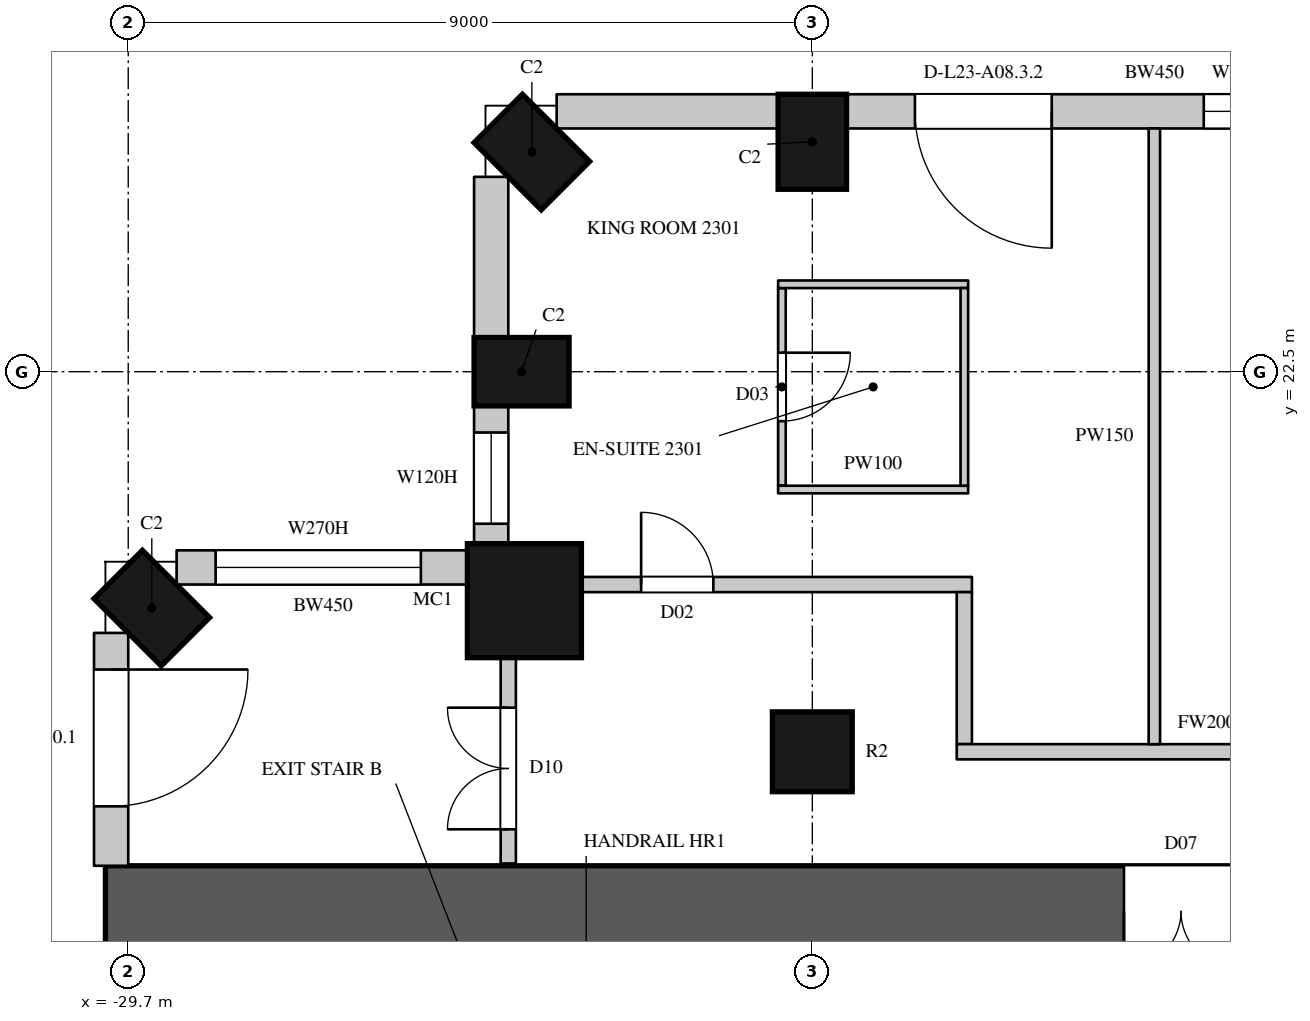
"""IFC4 building model, lengths in metres.
Left out: names, types, materials, properties, quantities, classifications, styles, units other than length and angle.
Written with IfcOpenShell. Run it as: python <this file> out.ifc"""

import sys

from ifc_helpers import new_model, si_unit, direction, frame, frame_2d, origin, origin_2d, place, context, subcontext, project, spatial, rectangle, circle, extrude, element, fill, save


model = new_model("IFC4")
c1 = context("Model", 3, precision=1e-05, world=origin(), true_north=direction((0.0, 1.0)))
c2 = subcontext(c1, "Body", "Model", "MODEL_VIEW")
j1 = project(units=[si_unit("LENGTHUNIT", "METRE"), si_unit("PLANEANGLEUNIT", "RADIAN")], contexts=[c1])
p1 = place(None, origin())
s1 = spatial("IfcSite", under=j1, at=p1, CompositionType="ELEMENT")
p2 = place(p1, origin())
s2 = spatial("IfcBuilding", under=s1, at=p2, CompositionType="ELEMENT")
p3 = place(p2, frame((0.0, 0.0, 113.1)))
s3 = spatial("IfcBuildingStorey", under=s2, at=p3, CompositionType="ELEMENT", Elevation=113.1)
for number, where, z_axis, x_axis in (
    (1, (-29.39, 19.39, 0.0), (0.0, 0.0, 1.0), (-0.707, -0.707, 0.0)),
    (2, (-20.7, 25.525, 0.0), (0.0, 0.0, 1.0), (-1.0, 0.0, 0.0)),
    (3, (-24.39, 25.39, 0.0), (0.0, 0.0, 1.0), (-0.707, -0.707, 0.0)),
    (4, (-24.525, 22.5, 0.0), (0.0, 0.0, 1.0), (0.0, -1.0, 0.0)),
):
    element("IfcColumn", number, at=place(p3, frame(where, z_axis=z_axis, x_axis=x_axis)), inside=s3, PredefinedType="COLUMN", context=c2, shape_type="SweptSolid", body=[
        extrude(rectangle(XDim=0.9, YDim=1.25, at=origin_2d()), origin(), (0.0, 0.0, 1.0), 3.6),
    ])
p4 = place(p3, frame((-24.488, 19.488, 0.0), z_axis=(0.0, 0.0, 1.0), x_axis=(1.0, 0.0, 0.0)))
e5 = element("IfcColumn", 5, at=p4, inside=s3, PredefinedType="COLUMN", context=c2, shape_type="SweptSolid", body=[
    extrude(circle(Radius=0.75, at=origin_2d()), origin(), (0.0, 0.0, 1.0), 3.6),
])
p5 = place(p3, frame((-20.7, 17.5, 0.0), z_axis=(0.0, 0.0, 1.0), x_axis=(1.0, 0.0, 0.0)))
e6 = element("IfcColumn", 6, at=p5, inside=s3, PredefinedType="COLUMN", context=c2, shape_type="SweptSolid", body=[
    extrude(circle(Radius=0.525, at=origin_2d()), origin(), (0.0, 0.0, 1.0), 3.6),
])
p6 = place(p3, frame((-29.925, 19.064, 0.0), z_axis=(0.0, 0.0, 1.0), x_axis=(0.0, -1.0, 0.0)))
e7 = element("IfcWall", 7, at=p6, inside=s3, PredefinedType="SOLIDWALL", context=c2, shape_type="SweptSolid", body=[
    extrude(rectangle(XDim=3.064, YDim=0.45, at=frame_2d((1.532, 0.0))), origin(), (0.0, 0.0, 1.0), 3.3),
])
p7 = place(p6, frame((0.482, 0.0, 0.0)))
e8 = element("IfcOpeningElement", 8, at=p7, cuts=e7, PredefinedType="OPENING", context=c2, shape_type="SweptSolid", body=[
    extrude(rectangle(XDim=1.8, YDim=2.4, at=frame_2d((0.9, 1.2))), frame((0.0, 0.235, 0.0), z_axis=(0.0, -1.0, 0.0), x_axis=(1.0, 0.0, 0.0)), (0.0, 0.0, 1.0), 0.47),
])
p8 = place(p3, frame((-12.15, 25.925, 0.0), z_axis=(0.0, 0.0, 1.0), x_axis=(-1.0, 0.0, 0.0)))
e9 = element("IfcWall", 9, at=p8, inside=s3, PredefinedType="SOLIDWALL", context=c2, shape_type="SweptSolid", body=[
    extrude(rectangle(XDim=8.1, YDim=0.45, at=frame_2d((4.05, 0.0))), origin(), (0.0, 0.0, 1.0), 3.3),
])
p9 = place(p8, frame((0.2, 0.0, 0.0)))
e10 = element("IfcOpeningElement", 10, at=p9, cuts=e9, PredefinedType="OPENING", context=c2, shape_type="SweptSolid", body=[
    extrude(rectangle(XDim=1.8, YDim=2.4, at=frame_2d((0.9, 1.2))), frame((0.0, 0.235, 0.0), z_axis=(0.0, -1.0, 0.0), x_axis=(1.0, 0.0, 0.0)), (0.0, 0.0, 1.0), 0.47),
])
p10 = place(p8, frame((2.2, 0.0, 1.05)))
e11 = element("IfcOpeningElement", 11, at=p10, cuts=e9, PredefinedType="OPENING", context=c2, shape_type="SweptSolid", body=[
    extrude(rectangle(XDim=1.2, YDim=2.0, at=frame_2d((0.6, 1.0))), frame((0.0, 0.235, 0.0), z_axis=(0.0, -1.0, 0.0), x_axis=(1.0, 0.0, 0.0)), (0.0, 0.0, 1.0), 0.47),
])
p11 = place(p8, frame((5.4, 0.0, 0.0)))
e12 = element("IfcOpeningElement", 12, at=p11, cuts=e9, PredefinedType="OPENING", context=c2, shape_type="SweptSolid", body=[
    extrude(rectangle(XDim=1.8, YDim=2.4, at=frame_2d((0.9, 1.2))), frame((0.0, 0.235, 0.0), z_axis=(0.0, -1.0, 0.0), x_axis=(1.0, 0.0, 0.0)), (0.0, 0.0, 1.0), 0.47),
])
p12 = place(p3, frame((-21.15, 25.925, 0.0), z_axis=(0.0, 0.0, 1.0), x_axis=(-1.0, 0.0, 0.0)))
e13 = element("IfcWall", 13, at=p12, inside=s3, PredefinedType="SOLIDWALL", context=c2, shape_type="SweptSolid", body=[
    extrude(rectangle(XDim=2.914, YDim=0.45, at=frame_2d((1.457, 0.0))), origin(), (0.0, 0.0, 1.0), 3.3),
])
p13 = place(p3, frame((-24.925, 25.064, 0.0), z_axis=(0.0, 0.0, 1.0), x_axis=(0.0, -1.0, 0.0)))
e14 = element("IfcWall", 14, at=p13, inside=s3, PredefinedType="SOLIDWALL", context=c2, shape_type="SweptSolid", body=[
    extrude(rectangle(XDim=2.114, YDim=0.45, at=frame_2d((1.057, 0.0))), origin(), (0.0, 0.0, 1.0), 3.3),
])
p14 = place(p3, frame((-24.925, 22.05, 0.0), z_axis=(0.0, 0.0, 1.0), x_axis=(0.0, -1.0, 0.0)))
e15 = element("IfcWall", 15, at=p14, inside=s3, PredefinedType="SOLIDWALL", context=c2, shape_type="SweptSolid", body=[
    extrude(rectangle(XDim=1.843, YDim=0.45, at=frame_2d((0.921, 0.0))), origin(), (0.0, 0.0, 1.0), 3.3),
])
p15 = place(p14, frame((0.35, 0.0, 1.05)))
e16 = element("IfcOpeningElement", 16, at=p15, cuts=e15, PredefinedType="OPENING", context=c2, shape_type="SweptSolid", body=[
    extrude(rectangle(XDim=1.2, YDim=2.0, at=frame_2d((0.6, 1.0))), frame((0.0, 0.235, 0.0), z_axis=(0.0, -1.0, 0.0), x_axis=(1.0, 0.0, 0.0)), (0.0, 0.0, 1.0), 0.47),
])
p16 = place(p3, frame((-25.207, 19.925, 0.0), z_axis=(0.0, 0.0, 1.0), x_axis=(-1.0, 0.0, 0.0)))
e17 = element("IfcWall", 17, at=p16, inside=s3, PredefinedType="SOLIDWALL", context=c2, shape_type="SweptSolid", body=[
    extrude(rectangle(XDim=3.857, YDim=0.45, at=frame_2d((1.928, 0.0))), origin(), (0.0, 0.0, 1.0), 3.3),
])
p17 = place(p16, frame((0.643, 0.0, 1.05)))
e18 = element("IfcOpeningElement", 18, at=p17, cuts=e17, PredefinedType="OPENING", context=c2, shape_type="SweptSolid", body=[
    extrude(rectangle(XDim=2.7, YDim=2.0, at=frame_2d((1.35, 1.0))), frame((0.0, 0.235, 0.0), z_axis=(0.0, -1.0, 0.0), x_axis=(1.0, 0.0, 0.0)), (0.0, 0.0, 1.0), 0.47),
])
p18 = place(p3, frame((-30.0, 15.4, 0.0), z_axis=(0.0, 0.0, 1.0), x_axis=(1.0, 0.0, 0.0)))
e19 = element("IfcWall", 19, at=p18, inside=s3, PredefinedType="SHEAR", context=c2, shape_type="SweptSolid", body=[
    extrude(rectangle(XDim=16.0, YDim=1.2, at=frame_2d((8.0, 0.0))), origin(), (0.0, 0.0, 1.0), 3.6),
])
p19 = place(p18, frame((13.4, 0.0, 0.0)))
e20 = element("IfcOpeningElement", 20, at=p19, cuts=e19, PredefinedType="OPENING", context=c2, shape_type="SweptSolid", body=[
    extrude(rectangle(XDim=1.5, YDim=2.4, at=frame_2d((0.75, 1.2))), frame((0.0, 0.61, 0.0), z_axis=(0.0, -1.0, 0.0), x_axis=(1.0, 0.0, 0.0)), (0.0, 0.0, 1.0), 1.22),
])
p20 = place(p3, frame((-24.7, 16.03, 0.0), z_axis=(0.0, 0.0, 1.0), x_axis=(0.0, 1.0, 0.0)))
e21 = element("IfcWall", 21, at=p20, inside=s3, PredefinedType="PARTITIONING", context=c2, shape_type="SweptSolid", body=[
    extrude(rectangle(XDim=2.722, YDim=0.2, at=frame_2d((1.361, 0.0))), origin(), (0.0, 0.0, 1.0), 3.3),
])
p21 = place(p20, frame((0.45, 0.0, 0.0)))
e22 = element("IfcOpeningElement", 22, at=p21, cuts=e21, PredefinedType="OPENING", context=c2, shape_type="SweptSolid", body=[
    extrude(rectangle(XDim=1.6, YDim=2.4, at=frame_2d((0.8, 1.2))), frame((0.0, 0.11, 0.0), z_axis=(0.0, -1.0, 0.0), x_axis=(1.0, 0.0, 0.0)), (0.0, 0.0, 1.0), 0.22),
])
p22 = place(p3, frame((-23.752, 19.7, 0.0), z_axis=(0.0, 0.0, 1.0), x_axis=(1.0, 0.0, 0.0)))
e23 = element("IfcWall", 23, at=p22, inside=s3, PredefinedType="PARTITIONING", context=c2, shape_type="SweptSolid", body=[
    extrude(rectangle(XDim=5.152, YDim=0.2, at=frame_2d((2.576, 0.0))), origin(), (0.0, 0.0, 1.0), 3.3),
])
p23 = place(p22, frame((0.8, 0.0, 0.0)))
e24 = element("IfcOpeningElement", 24, at=p23, cuts=e23, PredefinedType="OPENING", context=c2, shape_type="SweptSolid", body=[
    extrude(rectangle(XDim=0.95, YDim=2.2, at=frame_2d((0.475, 1.1))), frame((0.0, 0.11, 0.0), z_axis=(0.0, -1.0, 0.0), x_axis=(1.0, 0.0, 0.0)), (0.0, 0.0, 1.0), 0.22),
])
p24 = place(p3, frame((-18.7, 17.6, 0.0), z_axis=(0.0, 0.0, 1.0), x_axis=(0.0, 1.0, 0.0)))
e25 = element("IfcWall", 25, at=p24, inside=s3, PredefinedType="PARTITIONING", context=c2, shape_type="SweptSolid", body=[
    extrude(rectangle(XDim=2.0, YDim=0.2, at=frame_2d((1.0, 0.0))), origin(), (0.0, 0.0, 1.0), 3.3),
])
p25 = place(p3, frame((-18.8, 17.5, 0.0), z_axis=(0.0, 0.0, 1.0), x_axis=(1.0, 0.0, 0.0)))
e26 = element("IfcWall", 26, at=p25, inside=s3, PredefinedType="PARTITIONING", context=c2, shape_type="SweptSolid", body=[
    extrude(rectangle(XDim=6.575, YDim=0.2, at=frame_2d((3.288, 0.0))), origin(), (0.0, 0.0, 1.0), 2.75),
])
p26 = place(p25, frame((3.85, 0.0, 0.0)))
e27 = element("IfcOpeningElement", 27, at=p26, cuts=e26, PredefinedType="OPENING", context=c2, shape_type="SweptSolid", body=[
    extrude(rectangle(XDim=1.1, YDim=2.4, at=frame_2d((0.55, 1.2))), frame((0.0, 0.11, 0.0), z_axis=(0.0, -1.0, 0.0), x_axis=(1.0, 0.0, 0.0)), (0.0, 0.0, 1.0), 0.22),
])
p27 = place(p3, frame((-16.2, 17.6, 0.0), z_axis=(0.0, 0.0, 1.0), x_axis=(0.0, 1.0, 0.0)))
e28 = element("IfcWall", 28, at=p27, inside=s3, PredefinedType="PARTITIONING", context=c2, shape_type="SweptSolid", body=[
    extrude(rectangle(XDim=8.1, YDim=0.15, at=frame_2d((4.05, 0.0))), origin(), (0.0, 0.0, 1.0), 2.65),
])
p28 = place(p3, frame((-21.1, 21.0, 0.0), z_axis=(0.0, 0.0, 1.0), x_axis=(0.0, 1.0, 0.0)))
e29 = element("IfcWall", 29, at=p28, inside=s3, PredefinedType="PARTITIONING", context=c2, shape_type="SweptSolid", body=[
    extrude(rectangle(XDim=2.6, YDim=0.1, at=frame_2d((1.3, 0.0))), origin(), (0.0, 0.0, 1.0), 3.3),
])
p29 = place(p28, frame((0.85, 0.0, 0.0)))
e30 = element("IfcOpeningElement", 30, at=p29, cuts=e29, PredefinedType="OPENING", context=c2, shape_type="SweptSolid", body=[
    extrude(rectangle(XDim=0.9, YDim=2.2, at=frame_2d((0.45, 1.1))), frame((0.0, 0.06, 0.0), z_axis=(0.0, -1.0, 0.0), x_axis=(1.0, 0.0, 0.0)), (0.0, 0.0, 1.0), 0.12),
])
for number, where, z_axis, x_axis in (
    (31, (-21.15, 20.95, 0.0), (0.0, 0.0, 1.0), (1.0, 0.0, 0.0)),
    (32, (-21.15, 23.65, 0.0), (0.0, 0.0, 1.0), (1.0, 0.0, 0.0)),
):
    element("IfcWall", number, at=place(p3, frame(where, z_axis=z_axis, x_axis=x_axis)), inside=s3, PredefinedType="PARTITIONING", context=c2, shape_type="SweptSolid", body=[
        extrude(rectangle(XDim=2.5, YDim=0.1, at=frame_2d((1.25, 0.0))), origin(), (0.0, 0.0, 1.0), 3.3),
    ])
p30 = place(p3, frame((-18.7, 21.0, 0.0), z_axis=(0.0, 0.0, 1.0), x_axis=(0.0, 1.0, 0.0)))
e33 = element("IfcWall", 33, at=p30, inside=s3, PredefinedType="PARTITIONING", context=c2, shape_type="SweptSolid", body=[
    extrude(rectangle(XDim=2.6, YDim=0.1, at=frame_2d((1.3, 0.0))), origin(), (0.0, 0.0, 1.0), 3.3),
])
p31 = place(p7, origin())
e34 = element("IfcDoor", 34, at=p31, inside=s3, OperationType="SLIDING_TO_LEFT", PredefinedType="DOOR", context=c2, shape_type="SweptSolid", body=[
    extrude(rectangle(XDim=1.8, YDim=2.4, at=frame_2d((0.9, 1.2))), frame((0.0, 0.13, 0.0), z_axis=(0.0, -1.0, 0.0), x_axis=(1.0, 0.0, 0.0)), (0.0, 0.0, 1.0), 0.05),
])
fill(e8, e34)
p32 = place(p10, origin())
e35 = element("IfcWindow", 35, at=p32, inside=s3, PartitioningType="SINGLE_PANEL", PredefinedType="WINDOW", context=c2, shape_type="SweptSolid", body=[
    extrude(rectangle(XDim=1.2, YDim=2.0, at=frame_2d((0.6, 1.0))), frame((0.0, 0.135, 0.0), z_axis=(0.0, -1.0, 0.0), x_axis=(1.0, 0.0, 0.0)), (0.0, 0.0, 1.0), 0.06),
])
fill(e11, e35)
p33 = place(p11, origin())
e36 = element("IfcDoor", 36, at=p33, inside=s3, OperationType="SLIDING_TO_LEFT", PredefinedType="DOOR", context=c2, shape_type="SweptSolid", body=[
    extrude(rectangle(XDim=1.8, YDim=2.4, at=frame_2d((0.9, 1.2))), frame((0.0, 0.13, 0.0), z_axis=(0.0, -1.0, 0.0), x_axis=(1.0, 0.0, 0.0)), (0.0, 0.0, 1.0), 0.05),
])
fill(e12, e36)
p34 = place(p15, origin())
e37 = element("IfcWindow", 37, at=p34, inside=s3, PartitioningType="SINGLE_PANEL", PredefinedType="WINDOW", context=c2, shape_type="SweptSolid", body=[
    extrude(rectangle(XDim=1.2, YDim=2.0, at=frame_2d((0.6, 1.0))), frame((0.0, 0.135, 0.0), z_axis=(0.0, -1.0, 0.0), x_axis=(1.0, 0.0, 0.0)), (0.0, 0.0, 1.0), 0.06),
])
fill(e16, e37)
p35 = place(p17, origin())
e38 = element("IfcWindow", 38, at=p35, inside=s3, PartitioningType="SINGLE_PANEL", PredefinedType="WINDOW", context=c2, shape_type="SweptSolid", body=[
    extrude(rectangle(XDim=2.7, YDim=2.0, at=frame_2d((1.35, 1.0))), frame((0.0, 0.135, 0.0), z_axis=(0.0, -1.0, 0.0), x_axis=(1.0, 0.0, 0.0)), (0.0, 0.0, 1.0), 0.06),
])
fill(e18, e38)
p36 = place(p21, origin())
e39 = element("IfcDoor", 39, at=p36, inside=s3, OperationType="DOUBLE_DOOR_SINGLE_SWING", PredefinedType="DOOR", context=c2, shape_type="SweptSolid", body=[
    extrude(rectangle(XDim=1.6, YDim=2.4, at=frame_2d((0.8, 1.2))), frame((0.0, 0.025, 0.0), z_axis=(0.0, -1.0, 0.0), x_axis=(1.0, 0.0, 0.0)), (0.0, 0.0, 1.0), 0.05),
])
fill(e22, e39)
p37 = place(p23, origin())
e40 = element("IfcDoor", 40, at=p37, inside=s3, OperationType="SINGLE_SWING_LEFT", PredefinedType="DOOR", context=c2, shape_type="SweptSolid", body=[
    extrude(rectangle(XDim=0.95, YDim=2.2, at=frame_2d((0.475, 1.1))), frame((0.0, 0.025, 0.0), z_axis=(0.0, -1.0, 0.0), x_axis=(1.0, 0.0, 0.0)), (0.0, 0.0, 1.0), 0.05),
])
fill(e24, e40)
p38 = place(p29, origin())
e41 = element("IfcDoor", 41, at=p38, inside=s3, OperationType="SINGLE_SWING_LEFT", PredefinedType="DOOR", context=c2, shape_type="SweptSolid", body=[
    extrude(rectangle(XDim=0.9, YDim=2.2, at=frame_2d((0.45, 1.1))), frame((0.0, 0.025, 0.0), z_axis=(0.0, -1.0, 0.0), x_axis=(1.0, 0.0, 0.0)), (0.0, 0.0, 1.0), 0.05),
])
fill(e30, e41)
p39 = place(p19, origin())
e42 = element("IfcDoor", 42, at=p39, inside=s3, OperationType="DOUBLE_DOOR_SINGLE_SWING", PredefinedType="DOOR", context=c2, shape_type="SweptSolid", body=[
    extrude(rectangle(XDim=1.5, YDim=2.4, at=frame_2d((0.75, 1.2))), frame((0.0, 0.025, 0.0), z_axis=(0.0, -1.0, 0.0), x_axis=(1.0, 0.0, 0.0)), (0.0, 0.0, 1.0), 0.05),
])
fill(e20, e42)
save(model, sys.argv[1])
